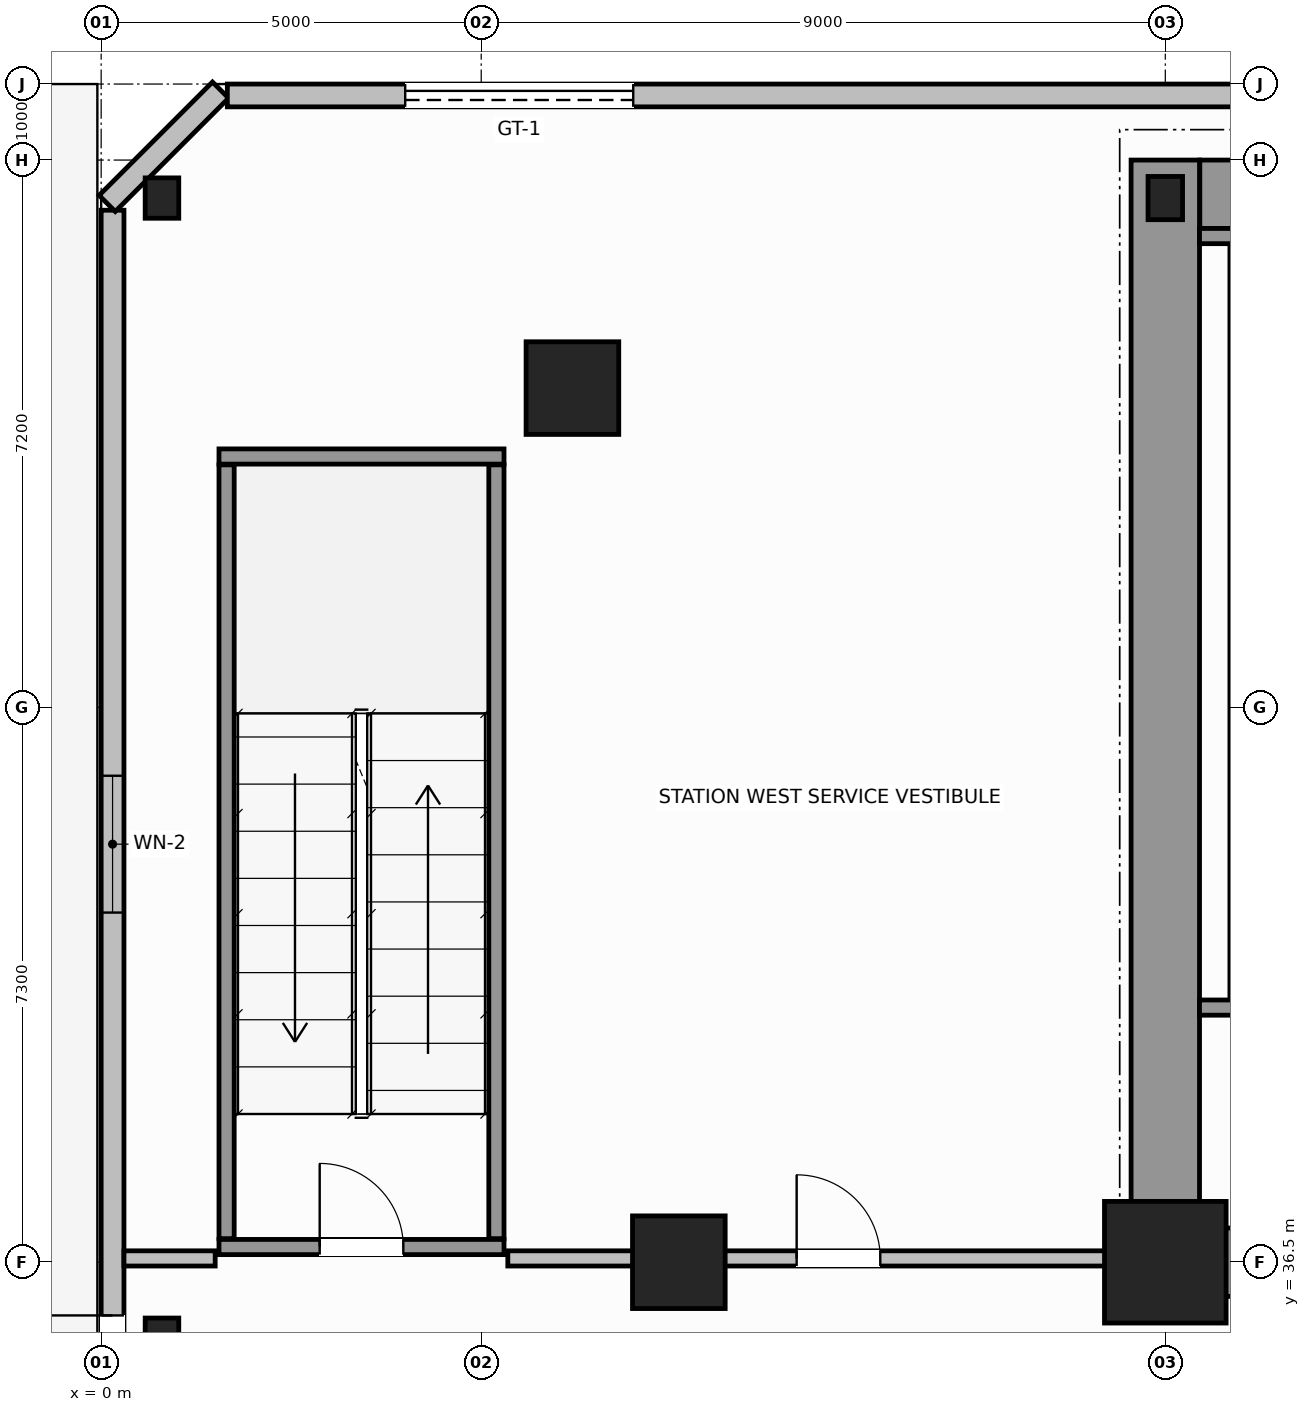
"""IFC4 building model, lengths in metres.
Left out: names, types, materials, properties, quantities, classifications, styles, units other than length and angle.
Written with IfcOpenShell. Run it as: python <this file> out.ifc"""

import sys

from ifc_helpers import new_model, si_unit, direction, frame, frame_2d, origin, origin_2d, place, context, subcontext, project, spatial, rectangle, hollow_circle, i_section, extrude, source, transform, mapped, element, fill, save


model = new_model("IFC4")
c1 = context("Model", 3, precision=1e-05, world=origin(), true_north=direction((0.0, 1.0)))
c2 = subcontext(c1, "Body", "Model", "MODEL_VIEW")
j1 = project(units=[si_unit("LENGTHUNIT", "METRE"), si_unit("PLANEANGLEUNIT", "RADIAN")], contexts=[c1])
p1 = place(None, origin())
s1 = spatial("IfcSite", under=j1, at=p1, CompositionType="ELEMENT")
p2 = place(p1, origin())
s2 = spatial("IfcBuilding", under=s1, at=p2, CompositionType="ELEMENT")
p3 = place(p2, origin())
s3 = spatial("IfcBuildingStorey", under=s2, at=p3, CompositionType="ELEMENT", Elevation=0.0)
m1 = source(origin(), c2, "Body", "SweptSolid", [
    extrude(rectangle(XDim=1.6, YDim=1.6, at=origin_2d()), origin(), (0.0, 0.0, 1.0), 5.6),
])
p4 = place(p3, frame((14.0, 36.5, 0.0), z_axis=(0.0, 0.0, 1.0), x_axis=(1.0, 0.0, 0.0)))
e1 = element("IfcColumn", 1, at=p4, inside=s3, PredefinedType="COLUMN", context=c2, shape_type="MappedRepresentation", body=[
    mapped(m1, transform((0.0, 0.0, 0.0), scale=1.0)),
])
m2 = source(origin(), c2, "Body", "SweptSolid", [
    extrude(i_section(OverallWidth=0.454, OverallDepth=0.569, WebThickness=0.078, FlangeThickness=0.08, FilletRadius=0.015, at=origin_2d()), origin(), (0.0, 0.0, 1.0), 5.6),
])
p5 = place(p3, frame((14.0, 50.5, 0.0), z_axis=(0.0, 0.0, 1.0), x_axis=(1.0, 0.0, 0.0)))
e2 = element("IfcColumn", 2, at=p5, inside=s3, PredefinedType="COLUMN", context=c2, shape_type="MappedRepresentation", body=[
    mapped(m2, transform((0.0, 0.0, 0.0), scale=1.0)),
])
m3 = source(origin(), c2, "Body", "SweptSolid", [
    extrude(hollow_circle(Radius=0.61, WallThickness=0.05, at=origin_2d()), origin(), (0.0, 0.0, 1.0), 5.6),
])
for number, where, z_axis, x_axis in (
    (3, (6.2, 48.0, 0.0), (0.0, 0.0, 1.0), (1.0, 0.0, 0.0)),
    (4, (7.6, 36.5, 0.0), (0.0, 0.0, 1.0), (1.0, 0.0, 0.0)),
):
    element("IfcColumn", number, at=place(p3, frame(where, z_axis=z_axis, x_axis=x_axis)), inside=s3, PredefinedType="COLUMN", context=c2, shape_type="MappedRepresentation", body=[
        mapped(m3, transform((0.0, 0.0, 0.0), scale=1.0)),
    ])
m4 = source(origin(), c2, "Body", "SweptSolid", [
    extrude(i_section(OverallWidth=0.442, OverallDepth=0.531, WebThickness=0.065, FlangeThickness=0.076, FilletRadius=0.015, at=origin_2d()), origin(), (0.0, 0.0, 1.0), 5.6),
])
for number, where, z_axis, x_axis in (
    (5, (0.8, 35.5, 0.0), (0.0, 0.0, 1.0), (1.0, 0.0, 0.0)),
    (6, (0.8, 50.5, 0.0), (0.0, 0.0, 1.0), (1.0, 0.0, 0.0)),
):
    element("IfcColumn", number, at=place(p3, frame(where, z_axis=z_axis, x_axis=x_axis)), inside=s3, PredefinedType="COLUMN", context=c2, shape_type="MappedRepresentation", body=[
        mapped(m4, transform((0.0, 0.0, 0.0), scale=1.0)),
    ])
p6 = place(p3, frame((14.454, 50.55, 0.0), z_axis=(0.0, 0.0, 1.0), x_axis=(1.0, 0.0, 0.0)))
e7 = element("IfcWall", 7, at=p6, inside=s3, PredefinedType="SHEAR", context=c2, shape_type="SweptSolid", body=[
    extrude(rectangle(XDim=19.544, YDim=0.9, at=frame_2d((9.772, 0.0))), origin(), (0.0, 0.0, 1.0), 5.6),
])
p7 = place(p3, frame((14.0, 36.5, 0.0), z_axis=(0.0, 0.0, 1.0), x_axis=(0.0, 1.0, 0.0)))
e8 = element("IfcWall", 8, at=p7, inside=s3, PredefinedType="SHEAR", context=c2, shape_type="SweptSolid", body=[
    extrude(rectangle(XDim=14.5, YDim=0.9, at=frame_2d((7.25, 0.0))), origin(), (0.0, 0.0, 1.0), 5.6),
])
p8 = place(p3, frame((14.47, 36.5, 0.0), z_axis=(0.0, 0.0, 1.0), x_axis=(1.0, 0.0, 0.0)))
e9 = element("IfcWall", 9, at=p8, inside=s3, PredefinedType="SHEAR", context=c2, shape_type="SweptSolid", body=[
    extrude(rectangle(XDim=3.73, YDim=0.9, at=frame_2d((1.865, 0.0))), origin(), (0.0, 0.0, 1.0), 4.12),
])
p9 = place(p3, frame((0.15, 1.66, 0.0), z_axis=(0.0, 0.0, 1.0), x_axis=(0.0, 1.0, 0.0)))
e10 = element("IfcWall", 10, at=p9, inside=s3, PredefinedType="STANDARD", context=c2, shape_type="SweptSolid", body=[
    extrude(rectangle(XDim=48.68, YDim=0.3, at=frame_2d((24.34, 0.0))), origin(), (0.0, 0.0, 1.0), 5.32),
])
p10 = place(p9, frame((23.44, 0.0, 0.0)))
e11 = element("IfcOpeningElement", 11, at=p10, cuts=e10, PredefinedType="OPENING", context=c2, shape_type="SweptSolid", body=[
    extrude(rectangle(XDim=1.8, YDim=2.4, at=frame_2d((0.9, 1.2))), frame((0.0, 0.16, 0.0), z_axis=(0.0, -1.0, 0.0), x_axis=(1.0, 0.0, 0.0)), (0.0, 0.0, 1.0), 0.32),
])
p11 = place(p9, frame((32.34, 0.0, 0.0)))
e12 = element("IfcOpeningElement", 12, at=p11, cuts=e10, PredefinedType="OPENING", context=c2, shape_type="SweptSolid", body=[
    extrude(rectangle(XDim=1.8, YDim=2.4, at=frame_2d((0.9, 1.2))), frame((0.0, 0.16, 0.0), z_axis=(0.0, -1.0, 0.0), x_axis=(1.0, 0.0, 0.0)), (0.0, 0.0, 1.0), 0.32),
])
p12 = place(p9, frame((5.84, 0.0, 0.0)))
e13 = element("IfcOpeningElement", 13, at=p12, cuts=e10, PredefinedType="OPENING", context=c2, shape_type="SweptSolid", body=[
    extrude(rectangle(XDim=3.0, YDim=2.8, at=frame_2d((1.5, 1.4))), frame((0.0, 0.16, 0.0), z_axis=(0.0, -1.0, 0.0), x_axis=(1.0, 0.0, 0.0)), (0.0, 0.0, 1.0), 0.32),
])
p13 = place(p9, frame((10.84, 0.0, 0.0)))
e14 = element("IfcOpeningElement", 14, at=p13, cuts=e10, PredefinedType="OPENING", context=c2, shape_type="SweptSolid", body=[
    extrude(rectangle(XDim=3.0, YDim=2.8, at=frame_2d((1.5, 1.4))), frame((0.0, 0.16, 0.0), z_axis=(0.0, -1.0, 0.0), x_axis=(1.0, 0.0, 0.0)), (0.0, 0.0, 1.0), 0.32),
])
p14 = place(p9, frame((16.64, 0.0, 1.1)))
e15 = element("IfcOpeningElement", 15, at=p14, cuts=e10, PredefinedType="OPENING", context=c2, shape_type="SweptSolid", body=[
    extrude(rectangle(XDim=1.8, YDim=2.0, at=frame_2d((0.9, 1.0))), frame((0.0, 0.16, 0.0), z_axis=(0.0, -1.0, 0.0), x_axis=(1.0, 0.0, 0.0)), (0.0, 0.0, 1.0), 0.32),
])
p15 = place(p9, frame((27.94, 0.0, 1.1)))
e16 = element("IfcOpeningElement", 16, at=p15, cuts=e10, PredefinedType="OPENING", context=c2, shape_type="SweptSolid", body=[
    extrude(rectangle(XDim=1.8, YDim=2.0, at=frame_2d((0.9, 1.0))), frame((0.0, 0.16, 0.0), z_axis=(0.0, -1.0, 0.0), x_axis=(1.0, 0.0, 0.0)), (0.0, 0.0, 1.0), 0.32),
])
p16 = place(p9, frame((39.44, 0.0, 1.1)))
e17 = element("IfcOpeningElement", 17, at=p16, cuts=e10, PredefinedType="OPENING", context=c2, shape_type="SweptSolid", body=[
    extrude(rectangle(XDim=1.8, YDim=2.0, at=frame_2d((0.9, 1.0))), frame((0.0, 0.16, 0.0), z_axis=(0.0, -1.0, 0.0), x_axis=(1.0, 0.0, 0.0)), (0.0, 0.0, 1.0), 0.32),
])
p17 = place(p3, frame((0.079, 50.429, 0.0), z_axis=(0.0, 0.0, 1.0), x_axis=(0.707106781187, 0.707106781187, 0.0)))
e18 = element("IfcWall", 18, at=p17, inside=s3, PredefinedType="STANDARD", context=c2, shape_type="SweptSolid", body=[
    extrude(rectangle(XDim=2.109, YDim=0.3, at=frame_2d((1.055, 0.0))), origin(), (0.0, 0.0, 1.0), 5.32),
])
p18 = place(p3, frame((1.66, 51.85, 0.0), z_axis=(0.0, 0.0, 1.0), x_axis=(1.0, 0.0, 0.0)))
e19 = element("IfcWall", 19, at=p18, inside=s3, PredefinedType="STANDARD", context=c2, shape_type="SweptSolid", body=[
    extrude(rectangle(XDim=64.68, YDim=0.3, at=frame_2d((32.34, 0.0))), origin(), (0.0, 0.0, 1.0), 5.32),
])
p19 = place(p18, frame((58.24, 0.0, 0.0)))
e20 = element("IfcOpeningElement", 20, at=p19, cuts=e19, PredefinedType="OPENING", context=c2, shape_type="SweptSolid", body=[
    extrude(rectangle(XDim=1.8, YDim=2.4, at=frame_2d((0.9, 1.2))), frame((0.0, 0.16, 0.0), z_axis=(0.0, -1.0, 0.0), x_axis=(1.0, 0.0, 0.0)), (0.0, 0.0, 1.0), 0.32),
])
p20 = place(p18, frame((2.34, 0.0, 0.0)))
e21 = element("IfcOpeningElement", 21, at=p20, cuts=e19, PredefinedType="OPENING", context=c2, shape_type="SweptSolid", body=[
    extrude(rectangle(XDim=3.0, YDim=2.8, at=frame_2d((1.5, 1.4))), frame((0.0, 0.16, 0.0), z_axis=(0.0, -1.0, 0.0), x_axis=(1.0, 0.0, 0.0)), (0.0, 0.0, 1.0), 0.32),
])
p21 = place(p18, frame((61.04, 0.0, 0.0)))
e22 = element("IfcOpeningElement", 22, at=p21, cuts=e19, PredefinedType="OPENING", context=c2, shape_type="SweptSolid", body=[
    extrude(rectangle(XDim=3.0, YDim=2.8, at=frame_2d((1.5, 1.4))), frame((0.0, 0.16, 0.0), z_axis=(0.0, -1.0, 0.0), x_axis=(1.0, 0.0, 0.0)), (0.0, 0.0, 1.0), 0.32),
])
p22 = place(p3, frame((14.45, 39.85, 0.0), z_axis=(0.0, 0.0, 1.0), x_axis=(1.0, 0.0, 0.0)))
e23 = element("IfcWall", 23, at=p22, inside=s3, PredefinedType="SOLIDWALL", context=c2, shape_type="SweptSolid", body=[
    extrude(rectangle(XDim=4.15, YDim=0.2, at=frame_2d((2.075, 0.0))), origin(), (0.0, 0.0, 1.0), 5.6),
])
p23 = place(p22, frame((1.725, 0.0, 0.0)))
e24 = element("IfcOpeningElement", 24, at=p23, cuts=e23, PredefinedType="OPENING", context=c2, shape_type="SweptSolid", body=[
    extrude(rectangle(XDim=1.1, YDim=2.15, at=frame_2d((0.55, 1.075))), frame((0.0, 0.11, 0.0), z_axis=(0.0, -1.0, 0.0), x_axis=(1.0, 0.0, 0.0)), (0.0, 0.0, 1.0), 0.22),
])
p24 = place(p3, frame((14.45, 50.0, 0.0), z_axis=(0.0, 0.0, 1.0), x_axis=(1.0, 0.0, 0.0)))
e25 = element("IfcWall", 25, at=p24, inside=s3, PredefinedType="SOLIDWALL", context=c2, shape_type="SweptSolid", body=[
    extrude(rectangle(XDim=4.15, YDim=0.2, at=frame_2d((2.075, 0.0))), origin(), (0.0, 0.0, 1.0), 5.6),
])
p25 = place(p3, frame((14.95, 39.96, 0.0), z_axis=(0.0, 0.0, 1.0), x_axis=(0.0, 1.0, 0.0)))
e26 = element("IfcWall", 26, at=p25, inside=s3, PredefinedType="SOLIDWALL", context=c2, shape_type="SweptSolid", body=[
    extrude(rectangle(XDim=9.93, YDim=0.2, at=frame_2d((4.965, 0.0))), origin(), (0.0, 0.0, 1.0), 5.6),
])
p26 = place(p3, frame((1.55, 36.7, 0.0), z_axis=(0.0, 0.0, 1.0), x_axis=(1.0, 0.0, 0.0)))
e27 = element("IfcWall", 27, at=p26, inside=s3, PredefinedType="SOLIDWALL", context=c2, shape_type="SweptSolid", body=[
    extrude(rectangle(XDim=3.75, YDim=0.2, at=frame_2d((1.875, 0.0))), origin(), (0.0, 0.0, 1.0), 5.6),
])
p27 = place(p26, frame((1.325, 0.0, 0.0)))
e28 = element("IfcOpeningElement", 28, at=p27, cuts=e27, PredefinedType="OPENING", context=c2, shape_type="SweptSolid", body=[
    extrude(rectangle(XDim=1.1, YDim=2.15, at=frame_2d((0.55, 1.075))), frame((0.0, 0.11, 0.0), z_axis=(0.0, -1.0, 0.0), x_axis=(1.0, 0.0, 0.0)), (0.0, 0.0, 1.0), 0.22),
])
p28 = place(p3, frame((1.55, 47.1, 0.0), z_axis=(0.0, 0.0, 1.0), x_axis=(1.0, 0.0, 0.0)))
e29 = element("IfcWall", 29, at=p28, inside=s3, PredefinedType="SOLIDWALL", context=c2, shape_type="SweptSolid", body=[
    extrude(rectangle(XDim=3.75, YDim=0.2, at=frame_2d((1.875, 0.0))), origin(), (0.0, 0.0, 1.0), 5.6),
])
for number, where, z_axis, x_axis in (
    (30, (1.65, 36.81, 0.0), (0.0, 0.0, 1.0), (0.0, 1.0, 0.0)),
    (31, (5.2, 36.81, 0.0), (0.0, 0.0, 1.0), (0.0, 1.0, 0.0)),
):
    element("IfcWall", number, at=place(p3, frame(where, z_axis=z_axis, x_axis=x_axis)), inside=s3, PredefinedType="SOLIDWALL", context=c2, shape_type="SweptSolid", body=[
        extrude(rectangle(XDim=10.18, YDim=0.2, at=frame_2d((5.09, 0.0))), origin(), (0.0, 0.0, 1.0), 5.6),
    ])
p29 = place(p3, frame((0.3, 36.55, 0.0), z_axis=(0.0, 0.0, 1.0), x_axis=(1.0, 0.0, 0.0)))
e32 = element("IfcWall", 32, at=p29, inside=s3, PredefinedType="SOLIDWALL", context=c2, shape_type="SweptSolid", body=[
    extrude(rectangle(XDim=1.2, YDim=0.2, at=frame_2d((0.6, 0.0))), origin(), (0.0, 0.0, 1.0), 5.32),
])
p30 = place(p3, frame((5.35, 36.55, 0.0), z_axis=(0.0, 0.0, 1.0), x_axis=(1.0, 0.0, 0.0)))
e33 = element("IfcWall", 33, at=p30, inside=s3, PredefinedType="SOLIDWALL", context=c2, shape_type="SweptSolid", body=[
    extrude(rectangle(XDim=8.55, YDim=0.2, at=frame_2d((4.275, 0.0))), origin(), (0.0, 0.0, 1.0), 4.4),
])
p31 = place(p30, frame((3.8, 0.0, 0.0)))
e34 = element("IfcOpeningElement", 34, at=p31, cuts=e33, PredefinedType="OPENING", context=c2, shape_type="SweptSolid", body=[
    extrude(rectangle(XDim=1.1, YDim=2.15, at=frame_2d((0.55, 1.075))), frame((0.0, 0.11, 0.0), z_axis=(0.0, -1.0, 0.0), x_axis=(1.0, 0.0, 0.0)), (0.0, 0.0, 1.0), 0.22),
])
m5 = source(origin(), c2, "Body", "SweptSolid", [
    extrude(rectangle(XDim=1.8, YDim=2.4, at=frame_2d((0.9, 1.2))), frame((0.0, 0.025, 0.0), z_axis=(0.0, -1.0, 0.0), x_axis=(1.0, 0.0, 0.0)), (0.0, 0.0, 1.0), 0.05),
])
p32 = place(p11, origin())
e35 = element("IfcDoor", 35, at=p32, inside=s3, OperationType="DOUBLE_DOOR_SINGLE_SWING", PredefinedType="DOOR", context=c2, shape_type="MappedRepresentation", body=[
    mapped(m5, transform((0.0, 0.0, 0.0), scale=1.0)),
])
fill(e12, e35)
m6 = source(origin(), c2, "Body", "SweptSolid", [
    extrude(rectangle(XDim=3.0, YDim=2.8, at=frame_2d((1.5, 1.4))), frame((0.0, 0.025, 0.0), z_axis=(0.0, -1.0, 0.0), x_axis=(1.0, 0.0, 0.0)), (0.0, 0.0, 1.0), 0.05),
])
p33 = place(p20, origin())
e36 = element("IfcDoor", 36, at=p33, inside=s3, OperationType="ROLLINGUP", PredefinedType="GATE", context=c2, shape_type="MappedRepresentation", body=[
    mapped(m6, transform((0.0, 0.0, 0.0), scale=1.0)),
])
fill(e21, e36)
m7 = source(origin(), c2, "Body", "SweptSolid", [
    extrude(rectangle(XDim=1.8, YDim=2.0, at=frame_2d((0.9, 1.0))), frame((0.0, 0.03, 0.0), z_axis=(0.0, -1.0, 0.0), x_axis=(1.0, 0.0, 0.0)), (0.0, 0.0, 1.0), 0.06),
])
p34 = place(p16, origin())
e37 = element("IfcWindow", 37, at=p34, inside=s3, PartitioningType="SINGLE_PANEL", PredefinedType="WINDOW", context=c2, shape_type="MappedRepresentation", body=[
    mapped(m7, transform((0.0, 0.0, 0.0), scale=1.0)),
])
fill(e17, e37)
m8 = source(origin(), c2, "Body", "SweptSolid", [
    extrude(rectangle(XDim=1.1, YDim=2.15, at=frame_2d((0.55, 1.075))), frame((0.0, 0.025, 0.0), z_axis=(0.0, -1.0, 0.0), x_axis=(1.0, 0.0, 0.0)), (0.0, 0.0, 1.0), 0.05),
])
p35 = place(p27, origin())
e38 = element("IfcDoor", 38, at=p35, inside=s3, OperationType="SINGLE_SWING_LEFT", PredefinedType="DOOR", context=c2, shape_type="MappedRepresentation", body=[
    mapped(m8, transform((0.0, 0.0, 0.0), scale=1.0)),
])
fill(e28, e38)
p36 = place(p31, origin())
e39 = element("IfcDoor", 39, at=p36, inside=s3, OperationType="SINGLE_SWING_LEFT", PredefinedType="DOOR", context=c2, shape_type="MappedRepresentation", body=[
    mapped(m8, transform((0.0, 0.0, 0.0), scale=1.0)),
])
fill(e34, e39)
save(model, sys.argv[1])
